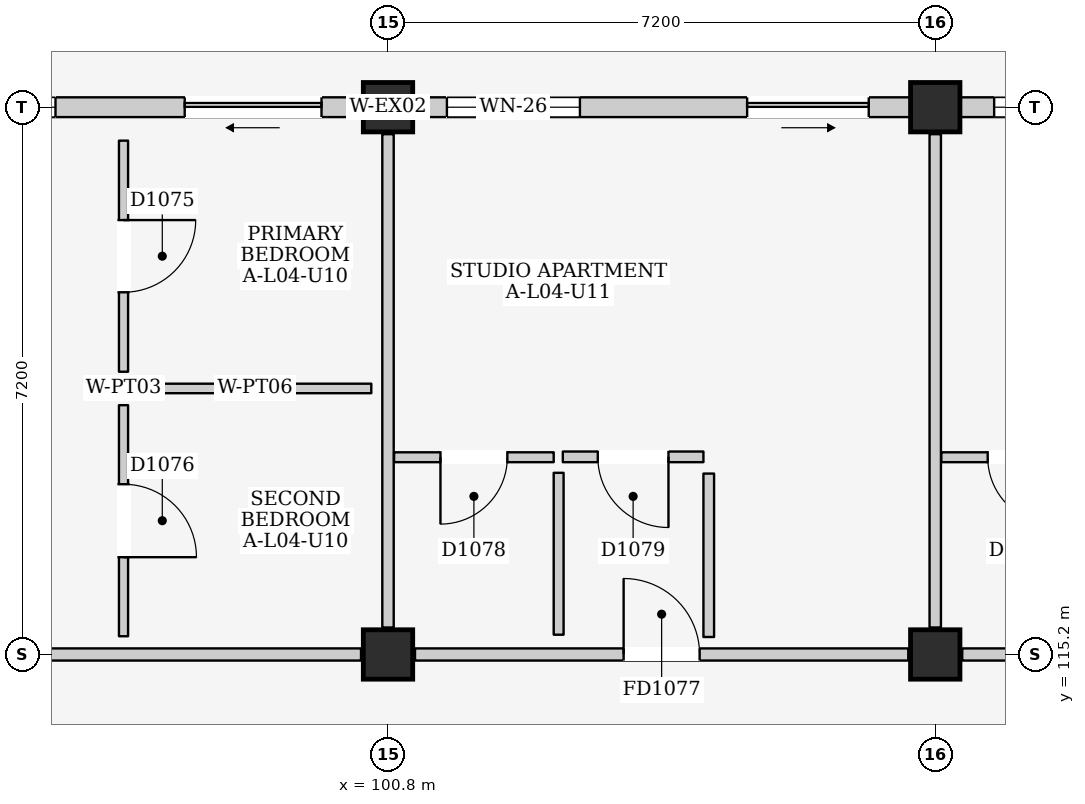
"""IFC4 building model, lengths in metres.
Left out: names, types, materials, properties, quantities, classifications, styles, units other than length and angle.
Written with IfcOpenShell. Run it as: python <this file> out.ifc"""

import sys

from ifc_helpers import new_model, si_unit, direction, frame, frame_2d, origin, origin_2d, place, context, subcontext, project, spatial, rectangle, extrude, element, fill, save


model = new_model("IFC4")
c1 = context("Model", 3, precision=1e-05, world=origin(), true_north=direction((0.0, 1.0)))
c2 = subcontext(c1, "Body", "Model", "MODEL_VIEW")
j1 = project(units=[si_unit("LENGTHUNIT", "METRE"), si_unit("PLANEANGLEUNIT", "RADIAN")], contexts=[c1])
p1 = place(None, origin())
s1 = spatial("IfcSite", under=j1, at=p1, CompositionType="ELEMENT")
p2 = place(p1, origin())
s2 = spatial("IfcBuilding", under=s1, at=p2, CompositionType="ELEMENT")
p3 = place(p2, frame((0.0, 0.0, 15.4)))
s3 = spatial("IfcBuildingStorey", under=s2, at=p3, CompositionType="ELEMENT", Elevation=15.4)
for number, where, z_axis, x_axis in (
    (1, (100.8, 115.2, 0.0), (0.0, 0.0, 1.0), (1.0, 0.0, 0.0)),
    (2, (100.8, 122.4, 0.0), (0.0, 0.0, 1.0), (1.0, 0.0, 0.0)),
    (3, (108.0, 115.2, 0.0), (0.0, 0.0, 1.0), (1.0, 0.0, 0.0)),
    (4, (108.0, 122.4, 0.0), (0.0, 0.0, 1.0), (1.0, 0.0, 0.0)),
):
    element("IfcColumn", number, at=place(p3, frame(where, z_axis=z_axis, x_axis=x_axis)), inside=s3, PredefinedType="COLUMN", context=c2, shape_type="SweptSolid", body=[
        extrude(rectangle(XDim=0.65, YDim=0.65, at=origin_2d()), origin(), (0.0, 0.0, 1.0), 3.2),
    ])
p4 = place(p3, frame((93.925, 122.4, 0.0), z_axis=(0.0, 0.0, 1.0), x_axis=(1.0, 0.0, 0.0)))
e5 = element("IfcWall", 5, at=p4, inside=s3, PredefinedType="ELEMENTEDWALL", context=c2, shape_type="SweptSolid", body=[
    extrude(rectangle(XDim=6.55, YDim=0.26, at=frame_2d((3.275, 0.0))), origin(), (0.0, 0.0, 1.0), 2.43),
])
p5 = place(p4, frame((4.2, 0.0, 0.0)))
e6 = element("IfcOpeningElement", 6, at=p5, cuts=e5, PredefinedType="OPENING", context=c2, shape_type="SweptSolid", body=[
    extrude(rectangle(XDim=1.8, YDim=2.12, at=frame_2d((0.9, 1.06))), frame((0.0, 0.145, 0.0), z_axis=(0.0, -1.0, 0.0), x_axis=(1.0, 0.0, 0.0)), (0.0, 0.0, 1.0), 0.29),
])
p6 = place(p4, frame((0.45, 0.0, 0.71)))
e7 = element("IfcOpeningElement", 7, at=p6, cuts=e5, PredefinedType="OPENING", context=c2, shape_type="SweptSolid", body=[
    extrude(rectangle(XDim=2.05, YDim=1.6, at=frame_2d((1.025, 0.8))), frame((0.0, 0.145, 0.0), z_axis=(0.0, -1.0, 0.0), x_axis=(1.0, 0.0, 0.0)), (0.0, 0.0, 1.0), 0.29),
])
p7 = place(p3, frame((101.125, 122.4, 0.0), z_axis=(0.0, 0.0, 1.0), x_axis=(1.0, 0.0, 0.0)))
e8 = element("IfcWall", 8, at=p7, inside=s3, PredefinedType="ELEMENTEDWALL", context=c2, shape_type="SweptSolid", body=[
    extrude(rectangle(XDim=6.55, YDim=0.26, at=frame_2d((3.275, 0.0))), origin(), (0.0, 0.0, 1.0), 2.43),
])
p8 = place(p7, frame((4.4, 0.0, 0.0)))
e9 = element("IfcOpeningElement", 9, at=p8, cuts=e8, PredefinedType="OPENING", context=c2, shape_type="SweptSolid", body=[
    extrude(rectangle(XDim=1.6, YDim=2.12, at=frame_2d((0.8, 1.06))), frame((0.0, 0.145, 0.0), z_axis=(0.0, -1.0, 0.0), x_axis=(1.0, 0.0, 0.0)), (0.0, 0.0, 1.0), 0.29),
])
p9 = place(p7, frame((0.45, 0.0, 0.76)))
e10 = element("IfcOpeningElement", 10, at=p9, cuts=e8, PredefinedType="OPENING", context=c2, shape_type="SweptSolid", body=[
    extrude(rectangle(XDim=1.75, YDim=1.55, at=frame_2d((0.875, 0.775))), frame((0.0, 0.145, 0.0), z_axis=(0.0, -1.0, 0.0), x_axis=(1.0, 0.0, 0.0)), (0.0, 0.0, 1.0), 0.29),
])
p10 = place(p3, frame((108.325, 122.4, 0.0), z_axis=(0.0, 0.0, 1.0), x_axis=(1.0, 0.0, 0.0)))
e11 = element("IfcWall", 11, at=p10, inside=s3, PredefinedType="ELEMENTEDWALL", context=c2, shape_type="SweptSolid", body=[
    extrude(rectangle(XDim=6.55, YDim=0.26, at=frame_2d((3.275, 0.0))), origin(), (0.0, 0.0, 1.0), 2.43),
])
p11 = place(p10, frame((4.5, 0.0, 0.0)))
e12 = element("IfcOpeningElement", 12, at=p11, cuts=e11, PredefinedType="OPENING", context=c2, shape_type="SweptSolid", body=[
    extrude(rectangle(XDim=1.5, YDim=2.12, at=frame_2d((0.75, 1.06))), frame((0.0, 0.145, 0.0), z_axis=(0.0, -1.0, 0.0), x_axis=(1.0, 0.0, 0.0)), (0.0, 0.0, 1.0), 0.29),
])
p12 = place(p10, frame((0.45, 0.0, 0.81)))
e13 = element("IfcOpeningElement", 13, at=p12, cuts=e11, PredefinedType="OPENING", context=c2, shape_type="SweptSolid", body=[
    extrude(rectangle(XDim=1.8, YDim=1.5, at=frame_2d((0.9, 0.75))), frame((0.0, 0.145, 0.0), z_axis=(0.0, -1.0, 0.0), x_axis=(1.0, 0.0, 0.0)), (0.0, 0.0, 1.0), 0.29),
])
p13 = place(p3, frame((93.955, 115.2, 0.0), z_axis=(0.0, 0.0, 1.0), x_axis=(1.0, 0.0, 0.0)))
e14 = element("IfcWall", 14, at=p13, inside=s3, PredefinedType="PARTITIONING", context=c2, shape_type="SweptSolid", body=[
    extrude(rectangle(XDim=6.49, YDim=0.16, at=frame_2d((3.245, 0.0))), origin(), (0.0, 0.0, 1.0), 2.285),
])
p14 = place(p3, frame((100.8, 115.555, 0.0), z_axis=(0.0, 0.0, 1.0), x_axis=(0.0, 1.0, 0.0)))
e15 = element("IfcWall", 15, at=p14, inside=s3, PredefinedType="PARTITIONING", context=c2, shape_type="SweptSolid", body=[
    extrude(rectangle(XDim=6.49, YDim=0.15, at=frame_2d((3.245, 0.0))), origin(), (0.0, 0.0, 1.0), 2.385),
])
p15 = place(p3, frame((97.32, 118.92, 0.0), z_axis=(0.0, 0.0, 1.0), x_axis=(0.0, 1.0, 0.0)))
e16 = element("IfcWall", 16, at=p15, inside=s3, PredefinedType="PARTITIONING", context=c2, shape_type="SweptSolid", body=[
    extrude(rectangle(XDim=3.04, YDim=0.12, at=frame_2d((1.52, 0.0))), origin(), (0.0, 0.0, 1.0), 2.95),
])
p16 = place(p15, frame((1.045, 0.0, 0.0)))
e17 = element("IfcOpeningElement", 17, at=p16, cuts=e16, PredefinedType="OPENING", context=c2, shape_type="SweptSolid", body=[
    extrude(rectangle(XDim=0.95, YDim=2.15, at=frame_2d((0.475, 1.075))), frame((0.0, 0.075, 0.0), z_axis=(0.0, -1.0, 0.0), x_axis=(1.0, 0.0, 0.0)), (0.0, 0.0, 1.0), 0.15),
])
p17 = place(p3, frame((97.52, 118.7, 0.0), z_axis=(0.0, 0.0, 1.0), x_axis=(1.0, 0.0, 0.0)))
e18 = element("IfcWall", 18, at=p17, inside=s3, PredefinedType="PARTITIONING", context=c2, shape_type="SweptSolid", body=[
    extrude(rectangle(XDim=3.06, YDim=0.125, at=frame_2d((1.53, 0.0))), origin(), (0.0, 0.0, 1.0), 2.95),
])
p18 = place(p3, frame((97.32, 115.44, 0.0), z_axis=(0.0, 0.0, 1.0), x_axis=(0.0, 1.0, 0.0)))
e19 = element("IfcWall", 19, at=p18, inside=s3, PredefinedType="PARTITIONING", context=c2, shape_type="SweptSolid", body=[
    extrude(rectangle(XDim=3.04, YDim=0.12, at=frame_2d((1.52, 0.0))), origin(), (0.0, 0.0, 1.0), 2.95),
])
p19 = place(p18, frame((1.04, 0.0, 0.0)))
e20 = element("IfcOpeningElement", 20, at=p19, cuts=e19, PredefinedType="OPENING", context=c2, shape_type="SweptSolid", body=[
    extrude(rectangle(XDim=0.96, YDim=2.15, at=frame_2d((0.48, 1.075))), frame((0.0, 0.075, 0.0), z_axis=(0.0, -1.0, 0.0), x_axis=(1.0, 0.0, 0.0)), (0.0, 0.0, 1.0), 0.15),
])
p20 = place(p3, frame((101.155, 115.2, 0.0), z_axis=(0.0, 0.0, 1.0), x_axis=(1.0, 0.0, 0.0)))
e21 = element("IfcWall", 21, at=p20, inside=s3, PredefinedType="PARTITIONING", context=c2, shape_type="SweptSolid", body=[
    extrude(rectangle(XDim=6.49, YDim=0.16, at=frame_2d((3.245, 0.0))), origin(), (0.0, 0.0, 1.0), 2.285),
])
p21 = place(p20, frame((2.745, 0.0, 0.0)))
e22 = element("IfcOpeningElement", 22, at=p21, cuts=e21, PredefinedType="OPENING", context=c2, shape_type="SweptSolid", body=[
    extrude(rectangle(XDim=1.0, YDim=2.15, at=frame_2d((0.5, 1.075))), frame((0.0, 0.095, 0.0), z_axis=(0.0, -1.0, 0.0), x_axis=(1.0, 0.0, 0.0)), (0.0, 0.0, 1.0), 0.19),
])
p22 = place(p3, frame((108.0, 115.555, 0.0), z_axis=(0.0, 0.0, 1.0), x_axis=(0.0, 1.0, 0.0)))
e23 = element("IfcWall", 23, at=p22, inside=s3, PredefinedType="PARTITIONING", context=c2, shape_type="SweptSolid", body=[
    extrude(rectangle(XDim=6.49, YDim=0.15, at=frame_2d((3.245, 0.0))), origin(), (0.0, 0.0, 1.0), 2.385),
])
p23 = place(p3, frame((100.88, 117.795, 0.0), z_axis=(0.0, 0.0, 1.0), x_axis=(1.0, 0.0, 0.0)))
e24 = element("IfcWall", 24, at=p23, inside=s3, PredefinedType="PARTITIONING", context=c2, shape_type="SweptSolid", body=[
    extrude(rectangle(XDim=2.1, YDim=0.13, at=frame_2d((1.05, 0.0))), origin(), (0.0, 0.0, 1.0), 2.95),
])
p24 = place(p23, frame((0.61, 0.0, 0.0)))
e25 = element("IfcOpeningElement", 25, at=p24, cuts=e24, PredefinedType="OPENING", context=c2, shape_type="SweptSolid", body=[
    extrude(rectangle(XDim=0.88, YDim=2.1, at=frame_2d((0.44, 1.05))), frame((0.0, 0.08, 0.0), z_axis=(0.0, -1.0, 0.0), x_axis=(1.0, 0.0, 0.0)), (0.0, 0.0, 1.0), 0.16),
])
p25 = place(p3, frame((103.045, 115.46, 0.0), z_axis=(0.0, 0.0, 1.0), x_axis=(0.0, 1.0, 0.0)))
e26 = element("IfcWall", 26, at=p25, inside=s3, PredefinedType="PARTITIONING", context=c2, shape_type="SweptSolid", body=[
    extrude(rectangle(XDim=2.13, YDim=0.13, at=frame_2d((1.065, 0.0))), origin(), (0.0, 0.0, 1.0), 2.95),
])
p26 = place(p3, frame((103.1, 117.8, 0.0), z_axis=(0.0, 0.0, 1.0), x_axis=(1.0, 0.0, 0.0)))
e27 = element("IfcWall", 27, at=p26, inside=s3, PredefinedType="PARTITIONING", context=c2, shape_type="SweptSolid", body=[
    extrude(rectangle(XDim=1.85, YDim=0.14, at=frame_2d((0.925, 0.0))), origin(), (0.0, 0.0, 1.0), 2.95),
])
p27 = place(p26, frame((0.46, 0.0, 0.0)))
e28 = element("IfcOpeningElement", 28, at=p27, cuts=e27, PredefinedType="OPENING", context=c2, shape_type="SweptSolid", body=[
    extrude(rectangle(XDim=0.93, YDim=2.14, at=frame_2d((0.465, 1.07))), frame((0.0, 0.085, 0.0), z_axis=(0.0, -1.0, 0.0), x_axis=(1.0, 0.0, 0.0)), (0.0, 0.0, 1.0), 0.17),
])
p28 = place(p3, frame((105.02, 115.43, 0.0), z_axis=(0.0, 0.0, 1.0), x_axis=(0.0, 1.0, 0.0)))
e29 = element("IfcWall", 29, at=p28, inside=s3, PredefinedType="PARTITIONING", context=c2, shape_type="SweptSolid", body=[
    extrude(rectangle(XDim=2.15, YDim=0.14, at=frame_2d((1.075, 0.0))), origin(), (0.0, 0.0, 1.0), 2.95),
])
p29 = place(p3, frame((108.355, 115.2, 0.0), z_axis=(0.0, 0.0, 1.0), x_axis=(1.0, 0.0, 0.0)))
e30 = element("IfcWall", 30, at=p29, inside=s3, PredefinedType="PARTITIONING", context=c2, shape_type="SweptSolid", body=[
    extrude(rectangle(XDim=6.49, YDim=0.16, at=frame_2d((3.245, 0.0))), origin(), (0.0, 0.0, 1.0), 2.285),
])
p30 = place(p29, frame((2.745, 0.0, 0.0)))
e31 = element("IfcOpeningElement", 31, at=p30, cuts=e30, PredefinedType="OPENING", context=c2, shape_type="SweptSolid", body=[
    extrude(rectangle(XDim=1.0, YDim=2.15, at=frame_2d((0.5, 1.075))), frame((0.0, 0.095, 0.0), z_axis=(0.0, -1.0, 0.0), x_axis=(1.0, 0.0, 0.0)), (0.0, 0.0, 1.0), 0.19),
])
p31 = place(p3, frame((108.08, 117.795, 0.0), z_axis=(0.0, 0.0, 1.0), x_axis=(1.0, 0.0, 0.0)))
e32 = element("IfcWall", 32, at=p31, inside=s3, PredefinedType="PARTITIONING", context=c2, shape_type="SweptSolid", body=[
    extrude(rectangle(XDim=2.1, YDim=0.13, at=frame_2d((1.05, 0.0))), origin(), (0.0, 0.0, 1.0), 2.95),
])
p32 = place(p31, frame((0.61, 0.0, 0.0)))
e33 = element("IfcOpeningElement", 33, at=p32, cuts=e32, PredefinedType="OPENING", context=c2, shape_type="SweptSolid", body=[
    extrude(rectangle(XDim=0.88, YDim=2.1, at=frame_2d((0.44, 1.05))), frame((0.0, 0.08, 0.0), z_axis=(0.0, -1.0, 0.0), x_axis=(1.0, 0.0, 0.0)), (0.0, 0.0, 1.0), 0.16),
])
p33 = place(p5, frame((1.8, 0.0, 0.0), z_axis=(0.0, 0.0, 1.0), x_axis=(-1.0, 0.0, 0.0)))
e34 = element("IfcDoor", 34, at=p33, inside=s3, OperationType="SLIDING_TO_LEFT", PredefinedType="DOOR", context=c2, shape_type="SweptSolid", body=[
    extrude(rectangle(XDim=1.8, YDim=2.12, at=frame_2d((0.9, 1.06))), frame((0.0, 0.025, 0.0), z_axis=(0.0, -1.0, 0.0), x_axis=(1.0, 0.0, 0.0)), (0.0, 0.0, 1.0), 0.05),
])
fill(e6, e34)
p34 = place(p6, origin())
e35 = element("IfcWindow", 35, at=p34, inside=s3, PartitioningType="DOUBLE_PANEL_VERTICAL", PredefinedType="WINDOW", context=c2, shape_type="SweptSolid", body=[
    extrude(rectangle(XDim=2.05, YDim=1.6, at=frame_2d((1.025, 0.8))), frame((0.0, 0.03, 0.0), z_axis=(0.0, -1.0, 0.0), x_axis=(1.0, 0.0, 0.0)), (0.0, 0.0, 1.0), 0.06),
])
fill(e7, e35)
p35 = place(p8, frame((1.6, 0.0, 0.0), z_axis=(0.0, 0.0, 1.0), x_axis=(-1.0, 0.0, 0.0)))
e36 = element("IfcDoor", 36, at=p35, inside=s3, OperationType="SLIDING_TO_RIGHT", PredefinedType="DOOR", context=c2, shape_type="SweptSolid", body=[
    extrude(rectangle(XDim=1.6, YDim=2.12, at=frame_2d((0.8, 1.06))), frame((0.0, 0.025, 0.0), z_axis=(0.0, -1.0, 0.0), x_axis=(1.0, 0.0, 0.0)), (0.0, 0.0, 1.0), 0.05),
])
fill(e9, e36)
p36 = place(p9, origin())
e37 = element("IfcWindow", 37, at=p36, inside=s3, PartitioningType="DOUBLE_PANEL_VERTICAL", PredefinedType="WINDOW", context=c2, shape_type="SweptSolid", body=[
    extrude(rectangle(XDim=1.75, YDim=1.55, at=frame_2d((0.875, 0.775))), frame((0.0, 0.03, 0.0), z_axis=(0.0, -1.0, 0.0), x_axis=(1.0, 0.0, 0.0)), (0.0, 0.0, 1.0), 0.06),
])
fill(e10, e37)
p37 = place(p12, origin())
e38 = element("IfcWindow", 38, at=p37, inside=s3, PartitioningType="DOUBLE_PANEL_VERTICAL", PredefinedType="WINDOW", context=c2, shape_type="SweptSolid", body=[
    extrude(rectangle(XDim=1.8, YDim=1.5, at=frame_2d((0.9, 0.75))), frame((0.0, 0.03, 0.0), z_axis=(0.0, -1.0, 0.0), x_axis=(1.0, 0.0, 0.0)), (0.0, 0.0, 1.0), 0.06),
])
fill(e13, e38)
p38 = place(p16, frame((0.95, 0.0, 0.0), z_axis=(0.0, 0.0, 1.0), x_axis=(-1.0, 0.0, 0.0)))
e39 = element("IfcDoor", 39, at=p38, inside=s3, OperationType="SINGLE_SWING_LEFT", PredefinedType="DOOR", context=c2, shape_type="SweptSolid", body=[
    extrude(rectangle(XDim=0.95, YDim=2.15, at=frame_2d((0.475, 1.075))), frame((0.0, 0.025, 0.0), z_axis=(0.0, -1.0, 0.0), x_axis=(1.0, 0.0, 0.0)), (0.0, 0.0, 1.0), 0.05),
])
fill(e17, e39)
p39 = place(p19, frame((0.96, 0.0, 0.0), z_axis=(0.0, 0.0, 1.0), x_axis=(-1.0, 0.0, 0.0)))
e40 = element("IfcDoor", 40, at=p39, inside=s3, OperationType="SINGLE_SWING_RIGHT", PredefinedType="DOOR", context=c2, shape_type="SweptSolid", body=[
    extrude(rectangle(XDim=0.96, YDim=2.15, at=frame_2d((0.48, 1.075))), frame((0.0, 0.025, 0.0), z_axis=(0.0, -1.0, 0.0), x_axis=(1.0, 0.0, 0.0)), (0.0, 0.0, 1.0), 0.05),
])
fill(e20, e40)
p40 = place(p21, origin())
e41 = element("IfcDoor", 41, at=p40, inside=s3, OperationType="SINGLE_SWING_LEFT", PredefinedType="DOOR", context=c2, shape_type="SweptSolid", body=[
    extrude(rectangle(XDim=1.0, YDim=2.15, at=frame_2d((0.5, 1.075))), frame((0.0, 0.025, 0.0), z_axis=(0.0, -1.0, 0.0), x_axis=(1.0, 0.0, 0.0)), (0.0, 0.0, 1.0), 0.05),
])
fill(e22, e41)
p41 = place(p24, frame((0.88, 0.0, 0.0), z_axis=(0.0, 0.0, 1.0), x_axis=(-1.0, 0.0, 0.0)))
e42 = element("IfcDoor", 42, at=p41, inside=s3, OperationType="SINGLE_SWING_RIGHT", PredefinedType="DOOR", context=c2, shape_type="SweptSolid", body=[
    extrude(rectangle(XDim=0.88, YDim=2.1, at=frame_2d((0.44, 1.05))), frame((0.0, 0.025, 0.0), z_axis=(0.0, -1.0, 0.0), x_axis=(1.0, 0.0, 0.0)), (0.0, 0.0, 1.0), 0.05),
])
fill(e25, e42)
p42 = place(p27, frame((0.93, 0.0, 0.0), z_axis=(0.0, 0.0, 1.0), x_axis=(-1.0, 0.0, 0.0)))
e43 = element("IfcDoor", 43, at=p42, inside=s3, OperationType="SINGLE_SWING_LEFT", PredefinedType="DOOR", context=c2, shape_type="SweptSolid", body=[
    extrude(rectangle(XDim=0.93, YDim=2.14, at=frame_2d((0.465, 1.07))), frame((0.0, 0.025, 0.0), z_axis=(0.0, -1.0, 0.0), x_axis=(1.0, 0.0, 0.0)), (0.0, 0.0, 1.0), 0.05),
])
fill(e28, e43)
p43 = place(p32, frame((0.88, 0.0, 0.0), z_axis=(0.0, 0.0, 1.0), x_axis=(-1.0, 0.0, 0.0)))
e44 = element("IfcDoor", 44, at=p43, inside=s3, OperationType="SINGLE_SWING_LEFT", PredefinedType="DOOR", context=c2, shape_type="SweptSolid", body=[
    extrude(rectangle(XDim=0.88, YDim=2.1, at=frame_2d((0.44, 1.05))), frame((0.0, 0.025, 0.0), z_axis=(0.0, -1.0, 0.0), x_axis=(1.0, 0.0, 0.0)), (0.0, 0.0, 1.0), 0.05),
])
fill(e33, e44)
save(model, sys.argv[1])
